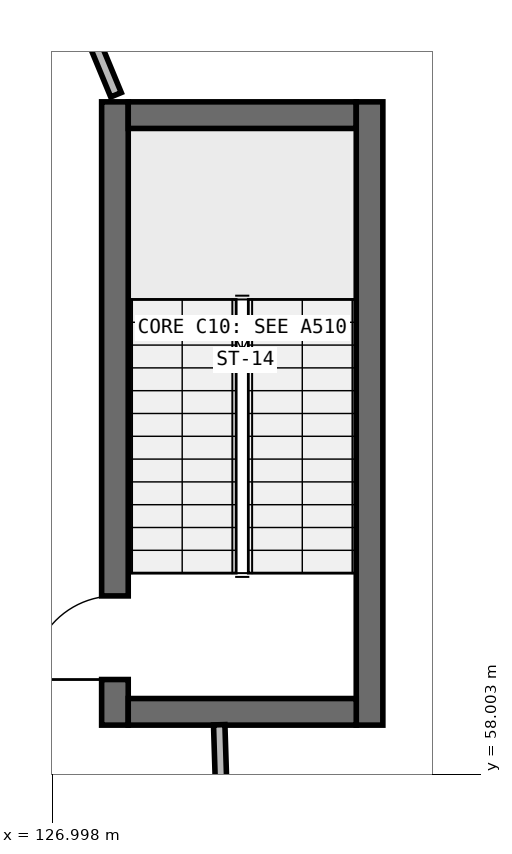
"""IFC4 building model, lengths in metres.
Left out: names, types, materials, properties, quantities, classifications, styles, units other than length and angle.
Written with IfcOpenShell. Run it as: python <this file> out.ifc"""

import sys

from ifc_helpers import new_model, si_unit, direction, frame, frame_2d, origin, place, context, subcontext, project, spatial, rectangle, extrude, element, fill, save


model = new_model("IFC4")
c1 = context("Model", 3, precision=1e-05, world=origin(), true_north=direction((0.0, 1.0)))
c2 = subcontext(c1, "Body", "Model", "MODEL_VIEW")
j1 = project(units=[si_unit("LENGTHUNIT", "METRE"), si_unit("PLANEANGLEUNIT", "RADIAN")], contexts=[c1])
p1 = place(None, origin())
s1 = spatial("IfcSite", under=j1, at=p1, CompositionType="ELEMENT")
p2 = place(p1, origin())
s2 = spatial("IfcBuilding", under=s1, at=p2, CompositionType="ELEMENT")
p3 = place(p2, frame((0.0, 0.0, 5.25)))
s3 = spatial("IfcBuildingStorey", under=s2, at=p3, CompositionType="ELEMENT", Elevation=5.25)
p4 = place(p3, frame((127.825, 58.65, 0.0), z_axis=(0.0, 0.0, 1.0), x_axis=(0.0, 1.0, 0.0)))
e1 = element("IfcWall", 1, at=p4, inside=s3, PredefinedType="SHEAR", context=c2, shape_type="SweptSolid", body=[
    extrude(rectangle(XDim=8.2, YDim=0.35, at=frame_2d((4.1, 0.0))), origin(), (0.0, 0.0, 1.0), 4.55),
])
p5 = place(p4, frame((0.6, 0.0, 0.0)))
e2 = element("IfcOpeningElement", 2, at=p5, cuts=e1, PredefinedType="OPENING", context=c2, shape_type="SweptSolid", body=[
    extrude(rectangle(XDim=1.1, YDim=2.15, at=frame_2d((0.55, 1.075))), frame((0.0, 0.185, 0.0), z_axis=(0.0, -1.0, 0.0), x_axis=(1.0, 0.0, 0.0)), (0.0, 0.0, 1.0), 0.37),
])
p6 = place(p3, frame((128.0, 66.675, 0.0), z_axis=(0.0, 0.0, 1.0), x_axis=(1.0, 0.0, 0.0)))
e3 = element("IfcWall", 3, at=p6, inside=s3, PredefinedType="SHEAR", context=c2, shape_type="SweptSolid", body=[
    extrude(rectangle(XDim=3.0, YDim=0.35, at=frame_2d((1.5, 0.0))), origin(), (0.0, 0.0, 1.0), 4.55),
])
p7 = place(p3, frame((131.175, 66.85, 0.0), z_axis=(0.0, 0.0, 1.0), x_axis=(0.0, -1.0, 0.0)))
e4 = element("IfcWall", 4, at=p7, inside=s3, PredefinedType="SHEAR", context=c2, shape_type="SweptSolid", body=[
    extrude(rectangle(XDim=8.2, YDim=0.35, at=frame_2d((4.1, 0.0))), origin(), (0.0, 0.0, 1.0), 4.55),
])
p8 = place(p3, frame((131.0, 58.825, 0.0), z_axis=(0.0, 0.0, 1.0), x_axis=(-1.0, 0.0, 0.0)))
e5 = element("IfcWall", 5, at=p8, inside=s3, PredefinedType="SHEAR", context=c2, shape_type="SweptSolid", body=[
    extrude(rectangle(XDim=3.0, YDim=0.35, at=frame_2d((1.5, 0.0))), origin(), (0.0, 0.0, 1.0), 4.55),
])
p9 = place(p3, frame((129.28, 56.0, 0.0), z_axis=(0.0, 0.0, 1.0), x_axis=(-0.031249099163, 0.999511627647, 0.0)))
e6 = element("IfcWall", 6, at=p9, inside=s3, PredefinedType="PARTITIONING", context=c2, shape_type="SweptSolid", body=[
    extrude(rectangle(XDim=2.656, YDim=0.15, at=frame_2d((1.328, 0.0))), origin(), (0.0, 0.0, 1.0), 4.23),
])
p10 = place(p3, frame((127.839, 66.943, 0.0), z_axis=(0.0, 0.0, 1.0), x_axis=(-0.382644845446, 0.923895514793, 0.0)))
e7 = element("IfcWall", 7, at=p10, inside=s3, PredefinedType="PARTITIONING", context=c2, shape_type="SweptSolid", body=[
    extrude(rectangle(XDim=11.037, YDim=0.15, at=frame_2d((5.518, 0.0))), origin(), (0.0, 0.0, 1.0), 3.737),
])
p11 = place(p10, frame((4.95, 0.0, 0.0)))
e8 = element("IfcOpeningElement", 8, at=p11, cuts=e7, PredefinedType="OPENING", context=c2, shape_type="SweptSolid", body=[
    extrude(rectangle(XDim=1.1, YDim=2.2, at=frame_2d((0.55, 1.1))), frame((0.0, 0.085, 0.0), z_axis=(0.0, -1.0, 0.0), x_axis=(1.0, 0.0, 0.0)), (0.0, 0.0, 1.0), 0.17),
])
p12 = place(p5, origin())
e9 = element("IfcDoor", 9, at=p12, inside=s3, OperationType="SINGLE_SWING_LEFT", PredefinedType="DOOR", context=c2, shape_type="SweptSolid", body=[
    extrude(rectangle(XDim=1.1, YDim=2.15, at=frame_2d((0.55, 1.075))), frame((0.0, 0.025, 0.0), z_axis=(0.0, -1.0, 0.0), x_axis=(1.0, 0.0, 0.0)), (0.0, 0.0, 1.0), 0.05),
])
fill(e2, e9)
save(model, sys.argv[1])
